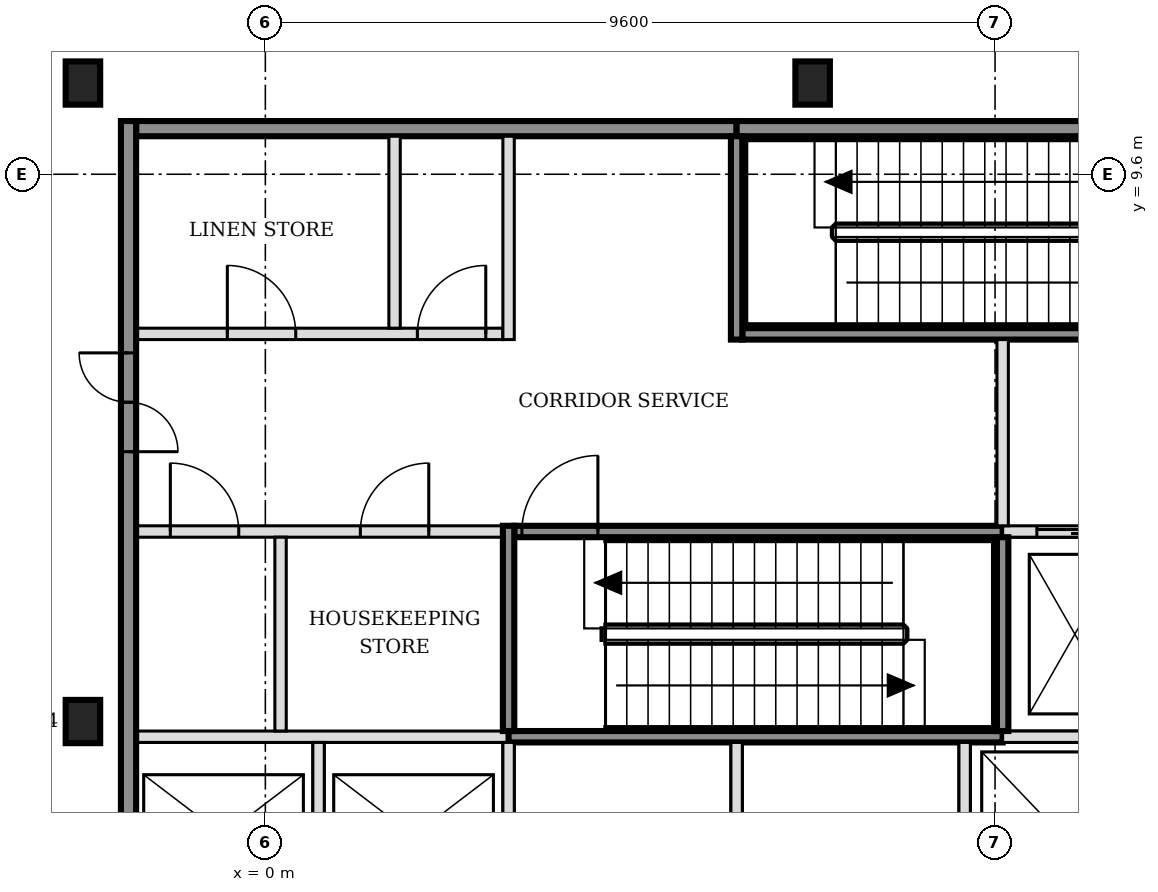
"""IFC4 building model, lengths in metres.
Left out: names, types, materials, properties, quantities, classifications, styles, units other than length and angle.
Written with IfcOpenShell. Run it as: python <this file> out.ifc"""

import sys

from ifc_helpers import new_model, si_unit, direction, frame, frame_2d, origin, origin_2d, place, context, subcontext, project, spatial, rectangle, i_section, extrude, element, fill, save


model = new_model("IFC4")
c1 = context("Model", 3, precision=1e-05, world=origin(), true_north=direction((0.0, 1.0)))
c2 = subcontext(c1, "Body", "Model", "MODEL_VIEW")
j1 = project(units=[si_unit("LENGTHUNIT", "METRE"), si_unit("PLANEANGLEUNIT", "RADIAN")], contexts=[c1])
p1 = place(None, origin())
s1 = spatial("IfcSite", under=j1, at=p1, CompositionType="ELEMENT")
p2 = place(p1, origin())
s2 = spatial("IfcBuilding", under=s1, at=p2, CompositionType="ELEMENT")
p3 = place(p2, frame((0.0, 0.0, 21.0)))
s3 = spatial("IfcBuildingStorey", under=s2, at=p3, CompositionType="ELEMENT", Elevation=21.0)
for number, where, z_axis, x_axis in (
    (1, (-2.4, 2.4, -0.2), (0.0, 0.0, 1.0), (1.0, 0.0, 0.0)),
    (2, (-2.4, 10.8, -0.2), (0.0, 0.0, 1.0), (1.0, 0.0, 0.0)),
    (3, (7.2, 10.8, -0.2), (0.0, 0.0, 1.0), (1.0, 0.0, 0.0)),
):
    element("IfcColumn", number, at=place(p3, frame(where, z_axis=z_axis, x_axis=x_axis)), inside=s3, PredefinedType="COLUMN", context=c2, shape_type="SweptSolid", body=[
        extrude(i_section(OverallWidth=0.454, OverallDepth=0.569, WebThickness=0.078, FlangeThickness=0.125, FilletRadius=0.015, at=origin_2d()), origin(), (0.0, 0.0, 1.0), 4.8),
    ])
p4 = place(p3, frame((-1.7, 2.2, 0.0), z_axis=(0.0, 0.0, 1.0), x_axis=(1.0, 0.0, 0.0)))
e4 = element("IfcWall", 4, at=p4, inside=s3, PredefinedType="SOLIDWALL", context=c2, shape_type="SweptSolid", body=[
    extrude(rectangle(XDim=4.9, YDim=0.15, at=frame_2d((2.45, 0.0))), origin(), (0.0, 0.0, 1.0), 4.6),
])
p5 = place(p3, frame((3.2, 2.2, 0.0), z_axis=(0.0, 0.0, 1.0), x_axis=(1.0, 0.0, 0.0)))
e5 = element("IfcWall", 5, at=p5, inside=s3, PredefinedType="SOLIDWALL", context=c2, shape_type="SweptSolid", body=[
    extrude(rectangle(XDim=6.5, YDim=0.15, at=frame_2d((3.25, 0.0))), origin(), (0.0, 0.0, 1.0), 4.6),
])
p6 = place(p3, frame((9.7, 2.2, 0.0), z_axis=(0.0, 0.0, 1.0), x_axis=(1.0, 0.0, 0.0)))
e6 = element("IfcWall", 6, at=p6, inside=s3, PredefinedType="SOLIDWALL", context=c2, shape_type="SweptSolid", body=[
    extrude(rectangle(XDim=4.525, YDim=0.15, at=frame_2d((2.263, 0.0))), origin(), (0.0, 0.0, 1.0), 4.6),
])
p7 = place(p3, frame((-1.7, 4.9, 0.0), z_axis=(0.0, 0.0, 1.0), x_axis=(1.0, 0.0, 0.0)))
e7 = element("IfcWall", 7, at=p7, inside=s3, PredefinedType="PARTITIONING", context=c2, shape_type="SweptSolid", body=[
    extrude(rectangle(XDim=4.825, YDim=0.15, at=frame_2d((2.413, 0.0))), origin(), (0.0, 0.0, 1.0), 4.6),
])
p8 = place(p7, frame((0.45, 0.0, 0.0)))
e8 = element("IfcOpeningElement", 8, at=p8, cuts=e7, PredefinedType="OPENING", context=c2, shape_type="SweptSolid", body=[
    extrude(rectangle(XDim=0.9, YDim=2.1, at=frame_2d((0.45, 1.05))), frame((0.0, 0.085, 0.0), z_axis=(0.0, -1.0, 0.0), x_axis=(1.0, 0.0, 0.0)), (0.0, 0.0, 1.0), 0.17),
])
p9 = place(p7, frame((2.95, 0.0, 0.0)))
e9 = element("IfcOpeningElement", 9, at=p9, cuts=e7, PredefinedType="OPENING", context=c2, shape_type="SweptSolid", body=[
    extrude(rectangle(XDim=0.9, YDim=2.1, at=frame_2d((0.45, 1.05))), frame((0.0, 0.085, 0.0), z_axis=(0.0, -1.0, 0.0), x_axis=(1.0, 0.0, 0.0)), (0.0, 0.0, 1.0), 0.17),
])
p10 = place(p3, frame((3.275, 4.9, 0.0), z_axis=(0.0, 0.0, 1.0), x_axis=(1.0, 0.0, 0.0)))
e10 = element("IfcWall", 10, at=p10, inside=s3, PredefinedType="SOLIDWALL", context=c2, shape_type="SweptSolid", body=[
    extrude(rectangle(XDim=6.425, YDim=0.15, at=frame_2d((3.212, 0.0))), origin(), (0.0, 0.0, 1.0), 4.6),
])
p11 = place(p10, frame((0.1, 0.0, 0.0)))
e11 = element("IfcOpeningElement", 11, at=p11, cuts=e10, PredefinedType="OPENING", context=c2, shape_type="SweptSolid", body=[
    extrude(rectangle(XDim=1.0, YDim=2.1, at=frame_2d((0.5, 1.05))), frame((0.0, 0.085, 0.0), z_axis=(0.0, -1.0, 0.0), x_axis=(1.0, 0.0, 0.0)), (0.0, 0.0, 1.0), 0.17),
])
p12 = place(p3, frame((9.7, 4.9, 0.0), z_axis=(0.0, 0.0, 1.0), x_axis=(1.0, 0.0, 0.0)))
e12 = element("IfcWall", 12, at=p12, inside=s3, PredefinedType="SOLIDWALL", context=c2, shape_type="SweptSolid", body=[
    extrude(rectangle(XDim=6.4, YDim=0.15, at=frame_2d((3.2, 0.0))), origin(), (0.0, 0.0, 1.0), 4.6),
])
p13 = place(p12, frame((0.45, 0.0, 0.0)))
e13 = element("IfcOpeningElement", 13, at=p13, cuts=e12, PredefinedType="OPENING", context=c2, shape_type="SweptSolid", body=[
    extrude(rectangle(XDim=1.0, YDim=2.1, at=frame_2d((0.5, 1.05))), frame((0.0, 0.085, 0.0), z_axis=(0.0, -1.0, 0.0), x_axis=(1.0, 0.0, 0.0)), (0.0, 0.0, 1.0), 0.17),
])
p14 = place(p12, frame((2.35, 0.0, 0.0)))
e14 = element("IfcOpeningElement", 14, at=p14, cuts=e12, PredefinedType="OPENING", context=c2, shape_type="SweptSolid", body=[
    extrude(rectangle(XDim=1.0, YDim=2.1, at=frame_2d((0.5, 1.05))), frame((0.0, 0.085, 0.0), z_axis=(0.0, -1.0, 0.0), x_axis=(1.0, 0.0, 0.0)), (0.0, 0.0, 1.0), 0.17),
])
p15 = place(p12, frame((4.7, 0.0, 0.0)))
e15 = element("IfcOpeningElement", 15, at=p15, cuts=e12, PredefinedType="OPENING", context=c2, shape_type="SweptSolid", body=[
    extrude(rectangle(XDim=0.9, YDim=2.1, at=frame_2d((0.45, 1.05))), frame((0.0, 0.085, 0.0), z_axis=(0.0, -1.0, 0.0), x_axis=(1.0, 0.0, 0.0)), (0.0, 0.0, 1.0), 0.17),
])
p16 = place(p3, frame((-1.7, 7.5, 0.0), z_axis=(0.0, 0.0, 1.0), x_axis=(1.0, 0.0, 0.0)))
e16 = element("IfcWall", 16, at=p16, inside=s3, PredefinedType="PARTITIONING", context=c2, shape_type="SweptSolid", body=[
    extrude(rectangle(XDim=4.825, YDim=0.15, at=frame_2d((2.413, 0.0))), origin(), (0.0, 0.0, 1.0), 4.6),
])
p17 = place(p16, frame((1.2, 0.0, 0.0)))
e17 = element("IfcOpeningElement", 17, at=p17, cuts=e16, PredefinedType="OPENING", context=c2, shape_type="SweptSolid", body=[
    extrude(rectangle(XDim=0.9, YDim=2.1, at=frame_2d((0.45, 1.05))), frame((0.0, 0.085, 0.0), z_axis=(0.0, -1.0, 0.0), x_axis=(1.0, 0.0, 0.0)), (0.0, 0.0, 1.0), 0.17),
])
p18 = place(p16, frame((3.7, 0.0, 0.0)))
e18 = element("IfcOpeningElement", 18, at=p18, cuts=e16, PredefinedType="OPENING", context=c2, shape_type="SweptSolid", body=[
    extrude(rectangle(XDim=0.9, YDim=2.1, at=frame_2d((0.45, 1.05))), frame((0.0, 0.085, 0.0), z_axis=(0.0, -1.0, 0.0), x_axis=(1.0, 0.0, 0.0)), (0.0, 0.0, 1.0), 0.17),
])
p19 = place(p3, frame((6.275, 7.5, 0.0), z_axis=(0.0, 0.0, 1.0), x_axis=(1.0, 0.0, 0.0)))
e19 = element("IfcWall", 19, at=p19, inside=s3, PredefinedType="SOLIDWALL", context=c2, shape_type="SweptSolid", body=[
    extrude(rectangle(XDim=6.425, YDim=0.15, at=frame_2d((3.212, 0.0))), origin(), (0.0, 0.0, 1.0), 4.6),
])
p20 = place(p19, frame((5.225, 0.0, 0.0)))
e20 = element("IfcOpeningElement", 20, at=p20, cuts=e19, PredefinedType="OPENING", context=c2, shape_type="SweptSolid", body=[
    extrude(rectangle(XDim=1.0, YDim=2.1, at=frame_2d((0.5, 1.05))), frame((0.0, 0.085, 0.0), z_axis=(0.0, -1.0, 0.0), x_axis=(1.0, 0.0, 0.0)), (0.0, 0.0, 1.0), 0.17),
])
p21 = place(p3, frame((-1.7, 10.2, 0.0), z_axis=(0.0, 0.0, 1.0), x_axis=(1.0, 0.0, 0.0)))
e21 = element("IfcWall", 21, at=p21, inside=s3, PredefinedType="SOLIDWALL", context=c2, shape_type="SweptSolid", body=[
    extrude(rectangle(XDim=7.9, YDim=0.2, at=frame_2d((3.95, 0.0))), origin(), (0.0, 0.0, 1.0), 4.6),
])
p22 = place(p3, frame((6.2, 10.2, 0.0), z_axis=(0.0, 0.0, 1.0), x_axis=(1.0, 0.0, 0.0)))
e22 = element("IfcWall", 22, at=p22, inside=s3, PredefinedType="SOLIDWALL", context=c2, shape_type="SweptSolid", body=[
    extrude(rectangle(XDim=6.5, YDim=0.2, at=frame_2d((3.25, 0.0))), origin(), (0.0, 0.0, 1.0), 4.6),
])
p23 = place(p3, frame((-1.8, -5.5, 0.0), z_axis=(0.0, 0.0, 1.0), x_axis=(0.0, 1.0, 0.0)))
e23 = element("IfcWall", 23, at=p23, inside=s3, PredefinedType="SOLIDWALL", context=c2, shape_type="SweptSolid", body=[
    extrude(rectangle(XDim=15.8, YDim=0.2, at=frame_2d((7.9, 0.0))), origin(), (0.0, 0.0, 1.0), 4.6),
])
p24 = place(p23, frame((3.05, 0.0, 0.0)))
e24 = element("IfcOpeningElement", 24, at=p24, cuts=e23, PredefinedType="OPENING", context=c2, shape_type="SweptSolid", body=[
    extrude(rectangle(XDim=1.3, YDim=2.1, at=frame_2d((0.65, 1.05))), frame((0.0, 0.11, 0.0), z_axis=(0.0, -1.0, 0.0), x_axis=(1.0, 0.0, 0.0)), (0.0, 0.0, 1.0), 0.22),
])
p25 = place(p23, frame((11.45, 0.0, 0.0)))
e25 = element("IfcOpeningElement", 25, at=p25, cuts=e23, PredefinedType="OPENING", context=c2, shape_type="SweptSolid", body=[
    extrude(rectangle(XDim=1.3, YDim=2.1, at=frame_2d((0.65, 1.05))), frame((0.0, 0.11, 0.0), z_axis=(0.0, -1.0, 0.0), x_axis=(1.0, 0.0, 0.0)), (0.0, 0.0, 1.0), 0.22),
])
p26 = place(p3, frame((0.2, 2.275, 0.0), z_axis=(0.0, 0.0, 1.0), x_axis=(0.0, 1.0, 0.0)))
e26 = element("IfcWall", 26, at=p26, inside=s3, PredefinedType="PARTITIONING", context=c2, shape_type="SweptSolid", body=[
    extrude(rectangle(XDim=2.55, YDim=0.15, at=frame_2d((1.275, 0.0))), origin(), (0.0, 0.0, 1.0), 4.6),
])
p27 = place(p3, frame((0.7, -0.325, 0.0), z_axis=(0.0, 0.0, 1.0), x_axis=(0.0, 1.0, 0.0)))
e27 = element("IfcWall", 27, at=p27, inside=s3, PredefinedType="SOLIDWALL", context=c2, shape_type="SweptSolid", body=[
    extrude(rectangle(XDim=2.45, YDim=0.15, at=frame_2d((1.225, 0.0))), origin(), (0.0, 0.0, 1.0), 4.6),
])
p28 = place(p3, frame((1.7, 7.575, 0.0), z_axis=(0.0, 0.0, 1.0), x_axis=(0.0, 1.0, 0.0)))
e28 = element("IfcWall", 28, at=p28, inside=s3, PredefinedType="PARTITIONING", context=c2, shape_type="SweptSolid", body=[
    extrude(rectangle(XDim=2.525, YDim=0.15, at=frame_2d((1.263, 0.0))), origin(), (0.0, 0.0, 1.0), 4.6),
])
p29 = place(p3, frame((3.2, -0.325, 0.0), z_axis=(0.0, 0.0, 1.0), x_axis=(0.0, 1.0, 0.0)))
e29 = element("IfcWall", 29, at=p29, inside=s3, PredefinedType="SOLIDWALL", context=c2, shape_type="SweptSolid", body=[
    extrude(rectangle(XDim=2.45, YDim=0.15, at=frame_2d((1.225, 0.0))), origin(), (0.0, 0.0, 1.0), 4.6),
])
p30 = place(p3, frame((3.2, 2.275, 0.0), z_axis=(0.0, 0.0, 1.0), x_axis=(0.0, 1.0, 0.0)))
e30 = element("IfcWall", 30, at=p30, inside=s3, PredefinedType="SOLIDWALL", context=c2, shape_type="SweptSolid", body=[
    extrude(rectangle(XDim=2.7, YDim=0.15, at=frame_2d((1.35, 0.0))), origin(), (0.0, 0.0, 1.0), 4.6),
])
p31 = place(p3, frame((3.2, 7.425, 0.0), z_axis=(0.0, 0.0, 1.0), x_axis=(0.0, 1.0, 0.0)))
e31 = element("IfcWall", 31, at=p31, inside=s3, PredefinedType="PARTITIONING", context=c2, shape_type="SweptSolid", body=[
    extrude(rectangle(XDim=2.675, YDim=0.15, at=frame_2d((1.337, 0.0))), origin(), (0.0, 0.0, 1.0), 4.6),
])
p32 = place(p3, frame((6.2, -0.325, 0.0), z_axis=(0.0, 0.0, 1.0), x_axis=(0.0, 1.0, 0.0)))
e32 = element("IfcWall", 32, at=p32, inside=s3, PredefinedType="SOLIDWALL", context=c2, shape_type="SweptSolid", body=[
    extrude(rectangle(XDim=2.45, YDim=0.15, at=frame_2d((1.225, 0.0))), origin(), (0.0, 0.0, 1.0), 4.6),
])
p33 = place(p3, frame((6.2, 7.425, 0.0), z_axis=(0.0, 0.0, 1.0), x_axis=(0.0, 1.0, 0.0)))
e33 = element("IfcWall", 33, at=p33, inside=s3, PredefinedType="SOLIDWALL", context=c2, shape_type="SweptSolid", body=[
    extrude(rectangle(XDim=2.675, YDim=0.15, at=frame_2d((1.337, 0.0))), origin(), (0.0, 0.0, 1.0), 4.6),
])
p34 = place(p3, frame((9.2, -0.325, 0.0), z_axis=(0.0, 0.0, 1.0), x_axis=(0.0, 1.0, 0.0)))
e34 = element("IfcWall", 34, at=p34, inside=s3, PredefinedType="SOLIDWALL", context=c2, shape_type="SweptSolid", body=[
    extrude(rectangle(XDim=2.45, YDim=0.15, at=frame_2d((1.225, 0.0))), origin(), (0.0, 0.0, 1.0), 4.6),
])
p35 = place(p3, frame((9.7, 2.275, 0.0), z_axis=(0.0, 0.0, 1.0), x_axis=(0.0, 1.0, 0.0)))
e35 = element("IfcWall", 35, at=p35, inside=s3, PredefinedType="SOLIDWALL", context=c2, shape_type="SweptSolid", body=[
    extrude(rectangle(XDim=2.55, YDim=0.15, at=frame_2d((1.275, 0.0))), origin(), (0.0, 0.0, 1.0), 4.6),
])
p36 = place(p3, frame((9.7, 4.975, 0.0), z_axis=(0.0, 0.0, 1.0), x_axis=(0.0, 1.0, 0.0)))
e36 = element("IfcWall", 36, at=p36, inside=s3, PredefinedType="SOLIDWALL", context=c2, shape_type="SweptSolid", body=[
    extrude(rectangle(XDim=2.45, YDim=0.15, at=frame_2d((1.225, 0.0))), origin(), (0.0, 0.0, 1.0), 4.6),
])
p37 = place(p13, origin())
e37 = element("IfcDoor", 37, at=p37, inside=s3, OperationType="DOUBLE_DOOR_SLIDING", PredefinedType="DOOR", context=c2, shape_type="SweptSolid", body=[
    extrude(rectangle(XDim=1.0, YDim=2.1, at=frame_2d((0.5, 1.05))), frame((0.0, 0.025, 0.0), z_axis=(0.0, -1.0, 0.0), x_axis=(1.0, 0.0, 0.0)), (0.0, 0.0, 1.0), 0.05),
])
fill(e13, e37)
p38 = place(p11, origin())
e38 = element("IfcDoor", 38, at=p38, inside=s3, OperationType="SINGLE_SWING_RIGHT", PredefinedType="DOOR", context=c2, shape_type="SweptSolid", body=[
    extrude(rectangle(XDim=1.0, YDim=2.1, at=frame_2d((0.5, 1.05))), frame((0.0, 0.025, 0.0), z_axis=(0.0, -1.0, 0.0), x_axis=(1.0, 0.0, 0.0)), (0.0, 0.0, 1.0), 0.05),
])
fill(e11, e38)
p39 = place(p25, origin())
e39 = element("IfcDoor", 39, at=p39, inside=s3, OperationType="DOUBLE_DOOR_SINGLE_SWING", PredefinedType="DOOR", context=c2, shape_type="SweptSolid", body=[
    extrude(rectangle(XDim=1.3, YDim=2.1, at=frame_2d((0.65, 1.05))), frame((0.0, 0.025, 0.0), z_axis=(0.0, -1.0, 0.0), x_axis=(1.0, 0.0, 0.0)), (0.0, 0.0, 1.0), 0.05),
])
fill(e25, e39)
p40 = place(p8, origin())
e40 = element("IfcDoor", 40, at=p40, inside=s3, OperationType="SINGLE_SWING_LEFT", PredefinedType="DOOR", context=c2, shape_type="SweptSolid", body=[
    extrude(rectangle(XDim=0.9, YDim=2.1, at=frame_2d((0.45, 1.05))), frame((0.0, 0.025, 0.0), z_axis=(0.0, -1.0, 0.0), x_axis=(1.0, 0.0, 0.0)), (0.0, 0.0, 1.0), 0.05),
])
fill(e8, e40)
p41 = place(p9, origin())
e41 = element("IfcDoor", 41, at=p41, inside=s3, OperationType="SINGLE_SWING_RIGHT", PredefinedType="DOOR", context=c2, shape_type="SweptSolid", body=[
    extrude(rectangle(XDim=0.9, YDim=2.1, at=frame_2d((0.45, 1.05))), frame((0.0, 0.025, 0.0), z_axis=(0.0, -1.0, 0.0), x_axis=(1.0, 0.0, 0.0)), (0.0, 0.0, 1.0), 0.05),
])
fill(e9, e41)
p42 = place(p17, origin())
e42 = element("IfcDoor", 42, at=p42, inside=s3, OperationType="SINGLE_SWING_LEFT", PredefinedType="DOOR", context=c2, shape_type="SweptSolid", body=[
    extrude(rectangle(XDim=0.9, YDim=2.1, at=frame_2d((0.45, 1.05))), frame((0.0, 0.025, 0.0), z_axis=(0.0, -1.0, 0.0), x_axis=(1.0, 0.0, 0.0)), (0.0, 0.0, 1.0), 0.05),
])
fill(e17, e42)
p43 = place(p18, origin())
e43 = element("IfcDoor", 43, at=p43, inside=s3, OperationType="SINGLE_SWING_RIGHT", PredefinedType="DOOR", context=c2, shape_type="SweptSolid", body=[
    extrude(rectangle(XDim=0.9, YDim=2.1, at=frame_2d((0.45, 1.05))), frame((0.0, 0.025, 0.0), z_axis=(0.0, -1.0, 0.0), x_axis=(1.0, 0.0, 0.0)), (0.0, 0.0, 1.0), 0.05),
])
fill(e18, e43)
save(model, sys.argv[1])
